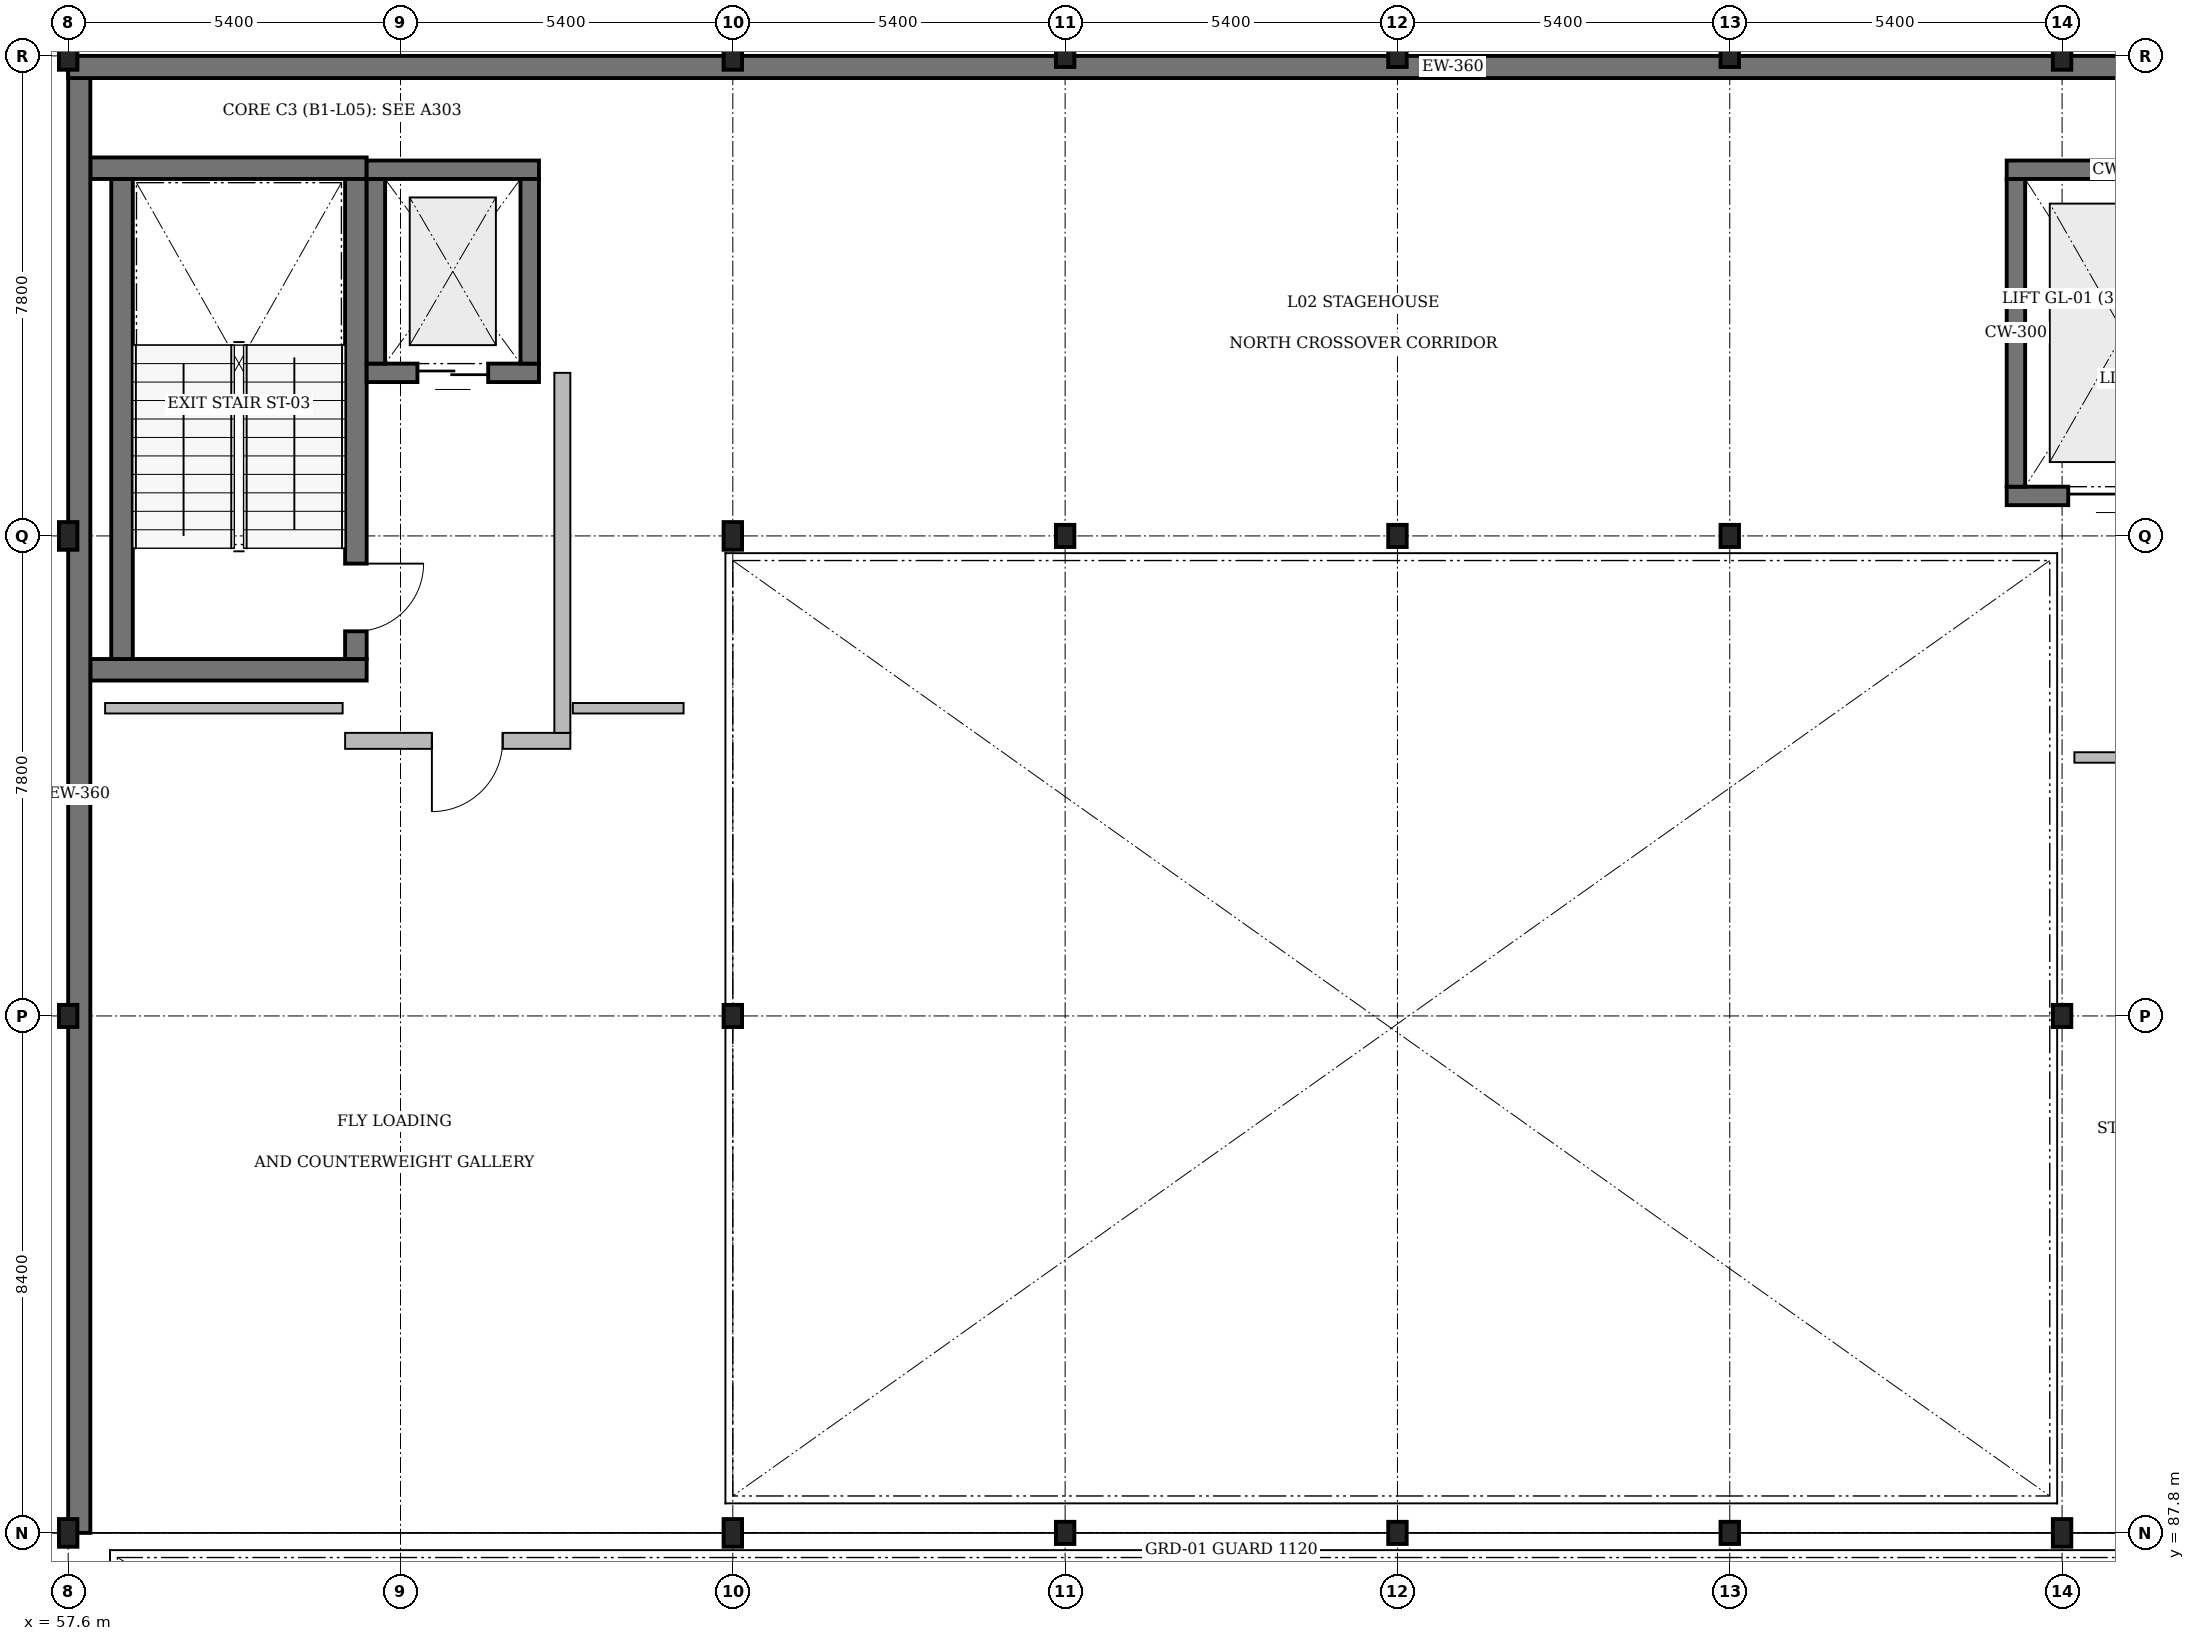
"""IFC4 building model, lengths in metres.
Left out: names, types, materials, properties, quantities, classifications, styles, units other than length and angle.
Written with IfcOpenShell. Run it as: python <this file> out.ifc"""

import sys

from ifc_helpers import new_model, si_unit, direction, frame, frame_2d, origin, origin_2d, place, context, subcontext, project, spatial, rectangle, i_section, extrude, element, fill, save


model = new_model("IFC4")
c1 = context("Model", 3, precision=1e-05, world=origin(), true_north=direction((0.0, 1.0)))
c2 = subcontext(c1, "Body", "Model", "MODEL_VIEW")
j1 = project(units=[si_unit("LENGTHUNIT", "METRE"), si_unit("PLANEANGLEUNIT", "RADIAN")], contexts=[c1])
p1 = place(None, origin())
s1 = spatial("IfcSite", under=j1, at=p1, CompositionType="ELEMENT")
p2 = place(p1, origin())
s2 = spatial("IfcBuilding", under=s1, at=p2, CompositionType="ELEMENT")
p3 = place(p2, frame((0.0, 0.0, 9.0)))
s3 = spatial("IfcBuildingStorey", under=s2, at=p3, CompositionType="ELEMENT", Elevation=9.0)
p4 = place(p3, frame((68.4, 87.8, 0.0), z_axis=(0.0, 0.0, 1.0), x_axis=(1.0, 0.0, 0.0)))
e1 = element("IfcColumn", 1, at=p4, inside=s3, PredefinedType="COLUMN", context=c2, shape_type="SweptSolid", body=[
    extrude(i_section(OverallWidth=0.3, OverallDepth=0.45, WebThickness=0.014, FlangeThickness=0.026, FilletRadius=0.027, at=origin_2d()), origin(), (0.0, 0.0, 1.0), 4.2),
])
p5 = place(p3, frame((68.4, 96.2, 0.0), z_axis=(0.0, 0.0, 1.0), x_axis=(1.0, 0.0, 0.0)))
e2 = element("IfcColumn", 2, at=p5, inside=s3, PredefinedType="COLUMN", context=c2, shape_type="SweptSolid", body=[
    extrude(i_section(OverallWidth=0.3, OverallDepth=0.36, WebThickness=0.012, FlangeThickness=0.022, FilletRadius=0.027, at=origin_2d()), origin(), (0.0, 0.0, 1.0), 4.2),
])
for number, where, z_axis, x_axis in (
    (3, (68.4, 104.0, 0.0), (0.0, 0.0, 1.0), (1.0, 0.0, 0.0)),
    (4, (68.4, 111.8, 0.0), (0.0, 0.0, 1.0), (1.0, 0.0, 0.0)),
):
    element("IfcColumn", number, at=place(p3, frame(where, z_axis=z_axis, x_axis=x_axis)), inside=s3, PredefinedType="COLUMN", context=c2, shape_type="SweptSolid", body=[
        extrude(i_section(OverallWidth=0.3, OverallDepth=0.45, WebThickness=0.014, FlangeThickness=0.026, FilletRadius=0.027, at=origin_2d()), origin(), (0.0, 0.0, 1.0), 4.2),
    ])
for number, where, z_axis, x_axis in (
    (5, (73.8, 87.8, 0.0), (0.0, 0.0, 1.0), (1.0, 0.0, 0.0)),
    (6, (73.8, 104.0, 0.0), (0.0, 0.0, 1.0), (1.0, 0.0, 0.0)),
    (7, (73.8, 111.8, 0.0), (0.0, 0.0, 1.0), (1.0, 0.0, 0.0)),
    (8, (79.2, 87.8, 0.0), (0.0, 0.0, 1.0), (1.0, 0.0, 0.0)),
    (9, (79.2, 104.0, 0.0), (0.0, 0.0, 1.0), (1.0, 0.0, 0.0)),
    (10, (79.2, 111.8, 0.0), (0.0, 0.0, 1.0), (1.0, 0.0, 0.0)),
    (11, (84.6, 87.8, 0.0), (0.0, 0.0, 1.0), (1.0, 0.0, 0.0)),
    (12, (84.6, 104.0, 0.0), (0.0, 0.0, 1.0), (1.0, 0.0, 0.0)),
    (13, (84.6, 111.8, 0.0), (0.0, 0.0, 1.0), (1.0, 0.0, 0.0)),
):
    element("IfcColumn", number, at=place(p3, frame(where, z_axis=z_axis, x_axis=x_axis)), inside=s3, PredefinedType="COLUMN", context=c2, shape_type="SweptSolid", body=[
        extrude(i_section(OverallWidth=0.3, OverallDepth=0.36, WebThickness=0.012, FlangeThickness=0.022, FilletRadius=0.027, at=origin_2d()), origin(), (0.0, 0.0, 1.0), 4.2),
    ])
p6 = place(p3, frame((90.0, 87.8, 0.0), z_axis=(0.0, 0.0, 1.0), x_axis=(1.0, 0.0, 0.0)))
e14 = element("IfcColumn", 14, at=p6, inside=s3, PredefinedType="COLUMN", context=c2, shape_type="SweptSolid", body=[
    extrude(i_section(OverallWidth=0.3, OverallDepth=0.45, WebThickness=0.014, FlangeThickness=0.026, FilletRadius=0.027, at=origin_2d()), origin(), (0.0, 0.0, 1.0), 4.2),
])
p7 = place(p3, frame((90.0, 96.2, 0.0), z_axis=(0.0, 0.0, 1.0), x_axis=(1.0, 0.0, 0.0)))
e15 = element("IfcColumn", 15, at=p7, inside=s3, PredefinedType="COLUMN", context=c2, shape_type="SweptSolid", body=[
    extrude(i_section(OverallWidth=0.3, OverallDepth=0.36, WebThickness=0.012, FlangeThickness=0.022, FilletRadius=0.027, at=origin_2d()), origin(), (0.0, 0.0, 1.0), 4.2),
])
for number, where, z_axis, x_axis in (
    (16, (90.0, 111.8, 0.0), (0.0, 0.0, 1.0), (1.0, 0.0, 0.0)),
    (17, (57.6, 87.8, 0.0), (0.0, 0.0, 1.0), (1.0, 0.0, 0.0)),
):
    element("IfcColumn", number, at=place(p3, frame(where, z_axis=z_axis, x_axis=x_axis)), inside=s3, PredefinedType="COLUMN", context=c2, shape_type="SweptSolid", body=[
        extrude(i_section(OverallWidth=0.3, OverallDepth=0.45, WebThickness=0.014, FlangeThickness=0.026, FilletRadius=0.027, at=origin_2d()), origin(), (0.0, 0.0, 1.0), 4.2),
    ])
p8 = place(p3, frame((57.6, 96.2, 0.0), z_axis=(0.0, 0.0, 1.0), x_axis=(1.0, 0.0, 0.0)))
e18 = element("IfcColumn", 18, at=p8, inside=s3, PredefinedType="COLUMN", context=c2, shape_type="SweptSolid", body=[
    extrude(i_section(OverallWidth=0.3, OverallDepth=0.36, WebThickness=0.012, FlangeThickness=0.022, FilletRadius=0.027, at=origin_2d()), origin(), (0.0, 0.0, 1.0), 4.2),
])
for number, where, z_axis, x_axis in (
    (19, (57.6, 104.0, 0.0), (0.0, 0.0, 1.0), (1.0, 0.0, 0.0)),
    (20, (57.6, 111.8, 0.0), (0.0, 0.0, 1.0), (1.0, 0.0, 0.0)),
):
    element("IfcColumn", number, at=place(p3, frame(where, z_axis=z_axis, x_axis=x_axis)), inside=s3, PredefinedType="COLUMN", context=c2, shape_type="SweptSolid", body=[
        extrude(i_section(OverallWidth=0.3, OverallDepth=0.45, WebThickness=0.014, FlangeThickness=0.026, FilletRadius=0.027, at=origin_2d()), origin(), (0.0, 0.0, 1.0), 4.2),
    ])
p9 = place(p3, frame((62.45, 101.825, 0.0), z_axis=(0.0, 0.0, 1.0), x_axis=(-1.0, 0.0, 0.0)))
e21 = element("IfcWall", 21, at=p9, inside=s3, PredefinedType="SOLIDWALL", context=c2, shape_type="SweptSolid", body=[
    extrude(rectangle(XDim=4.49, YDim=0.35, at=frame_2d((2.245, 0.0))), origin(), (0.0, 0.0, 1.0), 4.2),
])
p10 = place(p3, frame((58.475, 102.0, 0.0), z_axis=(0.0, 0.0, 1.0), x_axis=(0.0, 1.0, 0.0)))
e22 = element("IfcWall", 22, at=p10, inside=s3, PredefinedType="SOLIDWALL", context=c2, shape_type="SweptSolid", body=[
    extrude(rectangle(XDim=7.8, YDim=0.35, at=frame_2d((3.9, 0.0))), origin(), (0.0, 0.0, 1.0), 4.2),
])
p11 = place(p3, frame((57.96, 109.975, 0.0), z_axis=(0.0, 0.0, 1.0), x_axis=(1.0, 0.0, 0.0)))
e23 = element("IfcWall", 23, at=p11, inside=s3, PredefinedType="SOLIDWALL", context=c2, shape_type="SweptSolid", body=[
    extrude(rectangle(XDim=4.49, YDim=0.35, at=frame_2d((2.245, 0.0))), origin(), (0.0, 0.0, 1.0), 4.2),
])
p12 = place(p3, frame((62.275, 109.8, 0.0), z_axis=(0.0, 0.0, 1.0), x_axis=(0.0, -1.0, 0.0)))
e24 = element("IfcWall", 24, at=p12, inside=s3, PredefinedType="SOLIDWALL", context=c2, shape_type="SweptSolid", body=[
    extrude(rectangle(XDim=7.8, YDim=0.35, at=frame_2d((3.9, 0.0))), origin(), (0.0, 0.0, 1.0), 4.2),
])
p13 = place(p12, frame((6.25, 0.0, 0.0)))
e25 = element("IfcOpeningElement", 25, at=p13, cuts=e24, PredefinedType="OPENING", context=c2, shape_type="SweptSolid", body=[
    extrude(rectangle(XDim=1.1, YDim=2.15, at=frame_2d((0.55, 1.075))), frame((0.0, 0.195, 0.0), z_axis=(0.0, -1.0, 0.0), x_axis=(1.0, 0.0, 0.0)), (0.0, 0.0, 1.0), 0.39),
])
p14 = place(p3, frame((65.25, 106.65, 0.0), z_axis=(0.0, 0.0, 1.0), x_axis=(-1.0, 0.0, 0.0)))
e26 = element("IfcWall", 26, at=p14, inside=s3, PredefinedType="SOLIDWALL", context=c2, shape_type="SweptSolid", body=[
    extrude(rectangle(XDim=2.8, YDim=0.3, at=frame_2d((1.4, 0.0))), origin(), (0.0, 0.0, 1.0), 4.2),
])
p15 = place(p14, frame((0.825, 0.0, 0.0)))
e27 = element("IfcOpeningElement", 27, at=p15, cuts=e26, PredefinedType="OPENING", context=c2, shape_type="SweptSolid", body=[
    extrude(rectangle(XDim=1.15, YDim=2.1, at=frame_2d((0.575, 1.05))), frame((0.0, 0.17, 0.0), z_axis=(0.0, -1.0, 0.0), x_axis=(1.0, 0.0, 0.0)), (0.0, 0.0, 1.0), 0.34),
])
p16 = place(p3, frame((62.6, 106.8, 0.0), z_axis=(0.0, 0.0, 1.0), x_axis=(0.0, 1.0, 0.0)))
e28 = element("IfcWall", 28, at=p16, inside=s3, PredefinedType="SOLIDWALL", context=c2, shape_type="SweptSolid", body=[
    extrude(rectangle(XDim=3.0, YDim=0.3, at=frame_2d((1.5, 0.0))), origin(), (0.0, 0.0, 1.0), 4.2),
])
p17 = place(p3, frame((62.45, 109.95, 0.0), z_axis=(0.0, 0.0, 1.0), x_axis=(1.0, 0.0, 0.0)))
e29 = element("IfcWall", 29, at=p17, inside=s3, PredefinedType="SOLIDWALL", context=c2, shape_type="SweptSolid", body=[
    extrude(rectangle(XDim=2.8, YDim=0.3, at=frame_2d((1.4, 0.0))), origin(), (0.0, 0.0, 1.0), 4.2),
])
p18 = place(p3, frame((65.1, 109.8, 0.0), z_axis=(0.0, 0.0, 1.0), x_axis=(0.0, -1.0, 0.0)))
e30 = element("IfcWall", 30, at=p18, inside=s3, PredefinedType="SOLIDWALL", context=c2, shape_type="SweptSolid", body=[
    extrude(rectangle(XDim=3.0, YDim=0.3, at=frame_2d((1.5, 0.0))), origin(), (0.0, 0.0, 1.0), 4.2),
])
p19 = place(p3, frame((65.76, 100.67, 0.0), z_axis=(0.0, 0.0, 1.0), x_axis=(-1.0, 0.0, 0.0)))
e31 = element("IfcWall", 31, at=p19, inside=s3, PredefinedType="SOLIDWALL", context=c2, shape_type="SweptSolid", body=[
    extrude(rectangle(XDim=3.66, YDim=0.26, at=frame_2d((1.83, 0.0))), origin(), (0.0, 0.0, 1.0), 3.95),
])
p20 = place(p19, frame((1.1, 0.0, 0.0)))
e32 = element("IfcOpeningElement", 32, at=p20, cuts=e31, PredefinedType="OPENING", context=c2, shape_type="SweptSolid", body=[
    extrude(rectangle(XDim=1.15, YDim=2.2, at=frame_2d((0.575, 1.1))), frame((0.0, 0.15, 0.0), z_axis=(0.0, -1.0, 0.0), x_axis=(1.0, 0.0, 0.0)), (0.0, 0.0, 1.0), 0.3),
])
p21 = place(p3, frame((65.63, 106.65, 0.0), z_axis=(0.0, 0.0, 1.0), x_axis=(0.0, -1.0, 0.0)))
e33 = element("IfcWall", 33, at=p21, inside=s3, PredefinedType="SOLIDWALL", context=c2, shape_type="SweptSolid", body=[
    extrude(rectangle(XDim=5.85, YDim=0.26, at=frame_2d((2.925, 0.0))), origin(), (0.0, 0.0, 1.0), 3.95),
])
p22 = place(p3, frame((92.9, 104.65, 0.0), z_axis=(0.0, 0.0, 1.0), x_axis=(-1.0, 0.0, 0.0)))
e34 = element("IfcWall", 34, at=p22, inside=s3, PredefinedType="SOLIDWALL", context=c2, shape_type="SweptSolid", body=[
    extrude(rectangle(XDim=3.8, YDim=0.3, at=frame_2d((1.9, 0.0))), origin(), (0.0, 0.0, 1.0), 4.2),
])
p23 = place(p22, frame((1.0, 0.0, 0.0)))
e35 = element("IfcOpeningElement", 35, at=p23, cuts=e34, PredefinedType="OPENING", context=c2, shape_type="SweptSolid", body=[
    extrude(rectangle(XDim=1.8, YDim=2.4, at=frame_2d((0.9, 1.2))), frame((0.0, 0.17, 0.0), z_axis=(0.0, -1.0, 0.0), x_axis=(1.0, 0.0, 0.0)), (0.0, 0.0, 1.0), 0.34),
])
p24 = place(p3, frame((89.25, 104.8, 0.0), z_axis=(0.0, 0.0, 1.0), x_axis=(0.0, 1.0, 0.0)))
e36 = element("IfcWall", 36, at=p24, inside=s3, PredefinedType="SOLIDWALL", context=c2, shape_type="SweptSolid", body=[
    extrude(rectangle(XDim=5.0, YDim=0.3, at=frame_2d((2.5, 0.0))), origin(), (0.0, 0.0, 1.0), 4.2),
])
p25 = place(p3, frame((89.1, 109.95, 0.0), z_axis=(0.0, 0.0, 1.0), x_axis=(1.0, 0.0, 0.0)))
e37 = element("IfcWall", 37, at=p25, inside=s3, PredefinedType="SOLIDWALL", context=c2, shape_type="SweptSolid", body=[
    extrude(rectangle(XDim=3.8, YDim=0.3, at=frame_2d((1.9, 0.0))), origin(), (0.0, 0.0, 1.0), 4.2),
])
p26 = place(p3, frame((57.78, 87.8, 0.0), z_axis=(0.0, 0.0, 1.0), x_axis=(0.0, 1.0, 0.0)))
e38 = element("IfcWall", 38, at=p26, inside=s3, PredefinedType="SOLIDWALL", context=c2, shape_type="SweptSolid", body=[
    extrude(rectangle(XDim=24.0, YDim=0.36, at=frame_2d((12.0, 0.0))), origin(), (0.0, 0.0, 1.0), 3.96),
])
p27 = place(p3, frame((57.6, 111.62, 0.0), z_axis=(0.0, 0.0, 1.0), x_axis=(1.0, 0.0, 0.0)))
e39 = element("IfcWall", 39, at=p27, inside=s3, PredefinedType="SOLIDWALL", context=c2, shape_type="SweptSolid", body=[
    extrude(rectangle(XDim=45.0, YDim=0.36, at=frame_2d((22.5, 0.0))), origin(), (0.0, 0.0, 1.0), 3.96),
])
p28 = place(p3, frame((58.2, 101.2, 0.0), z_axis=(0.0, 0.0, 1.0), x_axis=(1.0, 0.0, 0.0)))
e40 = element("IfcWall", 40, at=p28, inside=s3, PredefinedType="PARTITIONING", context=c2, shape_type="SweptSolid", body=[
    extrude(rectangle(XDim=3.86, YDim=0.17, at=frame_2d((1.93, 0.0))), origin(), (0.0, 0.0, 1.0), 3.95),
])
p29 = place(p3, frame((65.8, 101.2, 0.0), z_axis=(0.0, 0.0, 1.0), x_axis=(1.0, 0.0, 0.0)))
e41 = element("IfcWall", 41, at=p29, inside=s3, PredefinedType="PARTITIONING", context=c2, shape_type="SweptSolid", body=[
    extrude(rectangle(XDim=1.8, YDim=0.17, at=frame_2d((0.9, 0.0))), origin(), (0.0, 0.0, 1.0), 3.95),
])
p30 = place(p3, frame((90.2, 100.4, 0.0), z_axis=(0.0, 0.0, 1.0), x_axis=(1.0, 0.0, 0.0)))
e42 = element("IfcWall", 42, at=p30, inside=s3, PredefinedType="PARTITIONING", context=c2, shape_type="SweptSolid", body=[
    extrude(rectangle(XDim=5.2, YDim=0.17, at=frame_2d((2.6, 0.0))), origin(), (0.0, 0.0, 1.0), 3.95),
])
p31 = place(p30, frame((3.75, 0.0, 0.0)))
e43 = element("IfcOpeningElement", 43, at=p31, cuts=e42, PredefinedType="OPENING", context=c2, shape_type="SweptSolid", body=[
    extrude(rectangle(XDim=1.1, YDim=2.1, at=frame_2d((0.55, 1.05))), frame((0.0, 0.105, 0.0), z_axis=(0.0, -1.0, 0.0), x_axis=(1.0, 0.0, 0.0)), (0.0, 0.0, 1.0), 0.21),
])
p32 = place(p13, origin())
e44 = element("IfcDoor", 44, at=p32, inside=s3, OperationType="SINGLE_SWING_LEFT", PredefinedType="DOOR", context=c2, shape_type="SweptSolid", body=[
    extrude(rectangle(XDim=1.1, YDim=2.15, at=frame_2d((0.55, 1.075))), frame((0.0, 0.025, 0.0), z_axis=(0.0, -1.0, 0.0), x_axis=(1.0, 0.0, 0.0)), (0.0, 0.0, 1.0), 0.05),
])
fill(e25, e44)
p33 = place(p15, origin())
e45 = element("IfcDoor", 45, at=p33, inside=s3, OperationType="DOUBLE_DOOR_SLIDING", PredefinedType="DOOR", context=c2, shape_type="SweptSolid", body=[
    extrude(rectangle(XDim=1.15, YDim=2.1, at=frame_2d((0.575, 1.05))), frame((0.0, 0.025, 0.0), z_axis=(0.0, -1.0, 0.0), x_axis=(1.0, 0.0, 0.0)), (0.0, 0.0, 1.0), 0.05),
])
fill(e27, e45)
p34 = place(p20, origin())
e46 = element("IfcDoor", 46, at=p34, inside=s3, OperationType="SINGLE_SWING_RIGHT", PredefinedType="DOOR", context=c2, shape_type="SweptSolid", body=[
    extrude(rectangle(XDim=1.15, YDim=2.2, at=frame_2d((0.575, 1.1))), frame((0.0, 0.025, 0.0), z_axis=(0.0, -1.0, 0.0), x_axis=(1.0, 0.0, 0.0)), (0.0, 0.0, 1.0), 0.05),
])
fill(e32, e46)
p35 = place(p23, origin())
e47 = element("IfcDoor", 47, at=p35, inside=s3, OperationType="DOUBLE_DOOR_SLIDING", PredefinedType="DOOR", context=c2, shape_type="SweptSolid", body=[
    extrude(rectangle(XDim=1.8, YDim=2.4, at=frame_2d((0.9, 1.2))), frame((0.0, 0.025, 0.0), z_axis=(0.0, -1.0, 0.0), x_axis=(1.0, 0.0, 0.0)), (0.0, 0.0, 1.0), 0.05),
])
fill(e35, e47)
save(model, sys.argv[1])
